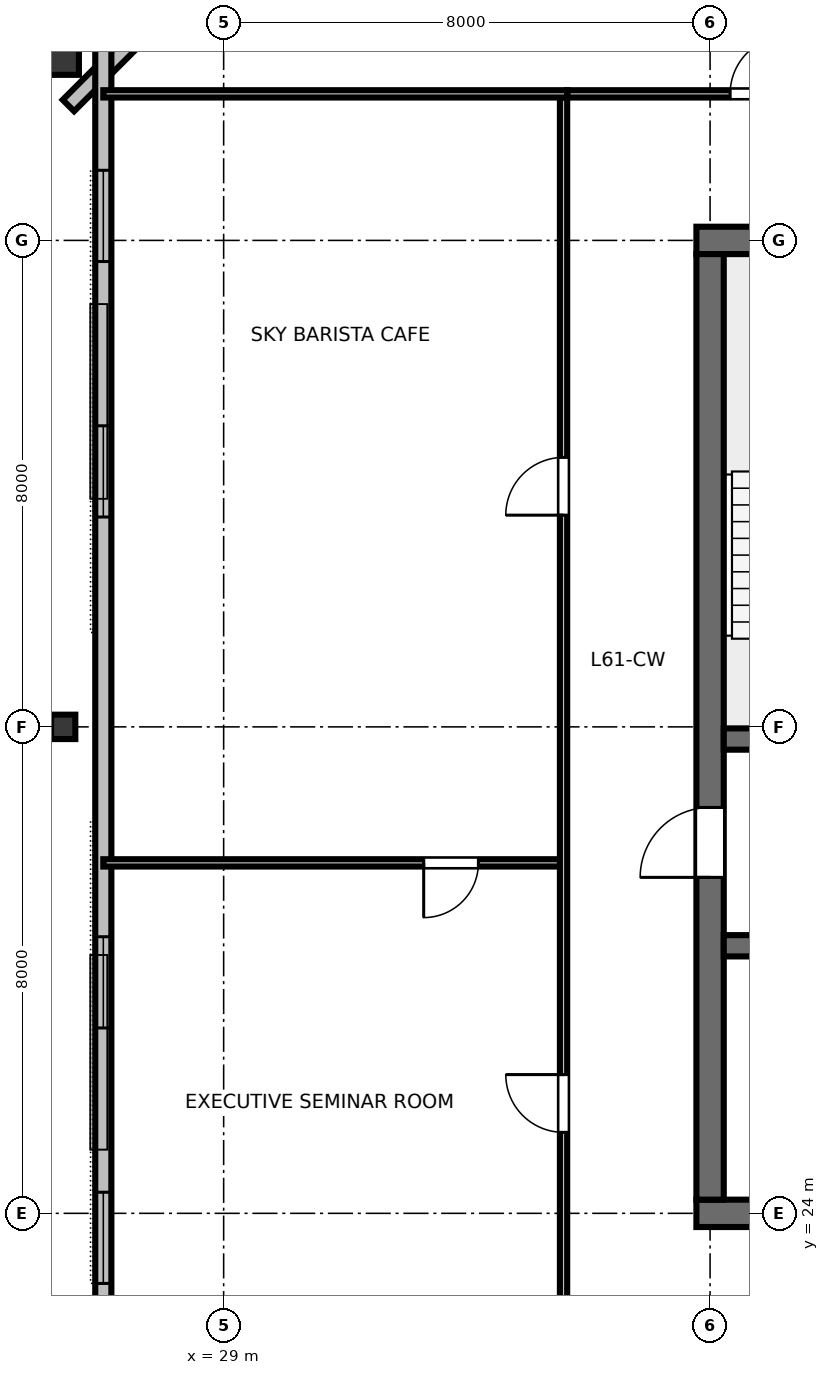
"""IFC4 building model, lengths in metres.
Left out: names, types, materials, properties, quantities, classifications, styles, units other than length and angle.
Written with IfcOpenShell. Run it as: python <this file> out.ifc"""

import sys

from ifc_helpers import new_model, si_unit, direction, frame, frame_2d, origin, origin_2d, place, context, subcontext, project, spatial, rectangle, hollow_rectangle, i_section, extrude, element, fill, save


model = new_model("IFC4")
c1 = context("Model", 3, precision=1e-05, world=origin(), true_north=direction((0.0, 1.0)))
c2 = subcontext(c1, "Body", "Model", "MODEL_VIEW")
j1 = project(units=[si_unit("LENGTHUNIT", "METRE"), si_unit("PLANEANGLEUNIT", "RADIAN")], contexts=[c1])
p1 = place(None, origin())
s1 = spatial("IfcSite", under=j1, at=p1, CompositionType="ELEMENT")
p2 = place(p1, origin())
s2 = spatial("IfcBuilding", under=s1, at=p2, CompositionType="ELEMENT")
p3 = place(p2, frame((0.0, 0.0, 231.0)))
s3 = spatial("IfcBuildingStorey", under=s2, at=p3, CompositionType="ELEMENT", Elevation=231.0)
p4 = place(p3, frame((36.775, 24.0, 0.0), z_axis=(0.0, 0.0, 1.0), x_axis=(1.0, 0.0, 0.0)))
e1 = element("IfcWall", 1, at=p4, inside=s3, PredefinedType="SHEAR", context=c2, shape_type="SweptSolid", body=[
    extrude(rectangle(XDim=18.45, YDim=0.45, at=frame_2d((9.225, 0.0))), origin(), (0.0, 0.0, 1.0), 3.28),
])
p5 = place(p4, frame((13.425, 0.0, 0.0)))
e2 = element("IfcOpeningElement", 2, at=p5, cuts=e1, PredefinedType="OPENING", context=c2, shape_type="SweptSolid", body=[
    extrude(rectangle(XDim=1.6, YDim=2.15, at=frame_2d((0.8, 1.075))), frame((0.0, 0.235, 0.0), z_axis=(0.0, -1.0, 0.0), x_axis=(1.0, 0.0, 0.0)), (0.0, 0.0, 1.0), 0.47),
])
p6 = place(p3, frame((36.775, 40.0, 0.0), z_axis=(0.0, 0.0, 1.0), x_axis=(1.0, 0.0, 0.0)))
e3 = element("IfcWall", 3, at=p6, inside=s3, PredefinedType="SHEAR", context=c2, shape_type="SweptSolid", body=[
    extrude(rectangle(XDim=18.45, YDim=0.45, at=frame_2d((9.225, 0.0))), origin(), (0.0, 0.0, 1.0), 3.28),
])
p7 = place(p6, frame((8.725, 0.0, 0.0)))
e4 = element("IfcOpeningElement", 4, at=p7, cuts=e3, PredefinedType="OPENING", context=c2, shape_type="SweptSolid", body=[
    extrude(rectangle(XDim=1.0, YDim=2.15, at=frame_2d((0.5, 1.075))), frame((0.0, 0.235, 0.0), z_axis=(0.0, -1.0, 0.0), x_axis=(1.0, 0.0, 0.0)), (0.0, 0.0, 1.0), 0.47),
])
p8 = place(p3, frame((37.0, 24.225, 0.0), z_axis=(0.0, 0.0, 1.0), x_axis=(0.0, 1.0, 0.0)))
e5 = element("IfcWall", 5, at=p8, inside=s3, PredefinedType="SHEAR", context=c2, shape_type="SweptSolid", body=[
    extrude(rectangle(XDim=15.55, YDim=0.45, at=frame_2d((7.775, 0.0))), origin(), (0.0, 0.0, 1.0), 3.28),
])
p9 = place(p8, frame((5.3, 0.0, 0.0)))
e6 = element("IfcOpeningElement", 6, at=p9, cuts=e5, PredefinedType="OPENING", context=c2, shape_type="SweptSolid", body=[
    extrude(rectangle(XDim=1.15, YDim=2.15, at=frame_2d((0.575, 1.075))), frame((0.0, 0.235, 0.0), z_axis=(0.0, -1.0, 0.0), x_axis=(1.0, 0.0, 0.0)), (0.0, 0.0, 1.0), 0.47),
])
p10 = place(p3, frame((37.225, 31.8, 0.0), z_axis=(0.0, 0.0, 1.0), x_axis=(1.0, 0.0, 0.0)))
e7 = element("IfcWall", 7, at=p10, inside=s3, PredefinedType="SHEAR", context=c2, shape_type="SweptSolid", body=[
    extrude(rectangle(XDim=17.55, YDim=0.35, at=frame_2d((8.775, 0.0))), origin(), (0.0, 0.0, 1.0), 3.28),
])
p11 = place(p10, frame((0.825, 0.0, 0.0)))
e8 = element("IfcOpeningElement", 8, at=p11, cuts=e7, PredefinedType="OPENING", context=c2, shape_type="SweptSolid", body=[
    extrude(rectangle(XDim=1.1, YDim=2.15, at=frame_2d((0.55, 1.075))), frame((0.0, 0.185, 0.0), z_axis=(0.0, -1.0, 0.0), x_axis=(1.0, 0.0, 0.0)), (0.0, 0.0, 1.0), 0.37),
])
p12 = place(p10, frame((14.725, 0.0, 0.0)))
e9 = element("IfcOpeningElement", 9, at=p12, cuts=e7, PredefinedType="OPENING", context=c2, shape_type="SweptSolid", body=[
    extrude(rectangle(XDim=1.1, YDim=2.15, at=frame_2d((0.55, 1.075))), frame((0.0, 0.185, 0.0), z_axis=(0.0, -1.0, 0.0), x_axis=(1.0, 0.0, 0.0)), (0.0, 0.0, 1.0), 0.37),
])
p13 = place(p3, frame((37.225, 28.4, 0.0), z_axis=(0.0, 0.0, 1.0), x_axis=(1.0, 0.0, 0.0)))
e10 = element("IfcWall", 10, at=p13, inside=s3, PredefinedType="SHEAR", context=c2, shape_type="SweptSolid", body=[
    extrude(rectangle(XDim=17.55, YDim=0.35, at=frame_2d((8.775, 0.0))), origin(), (0.0, 0.0, 1.0), 3.28),
])
p14 = place(p3, frame((26.27, 43.013, 0.0), z_axis=(0.062492571187, -0.054773773796, 0.996541274735), x_axis=(-0.749422115547, 0.656856913627, 0.083099264433)))
e11 = element("IfcColumn", 11, at=p14, inside=s3, PredefinedType="COLUMN", context=c2, shape_type="SweptSolid", body=[
    extrude(hollow_rectangle(XDim=0.58, YDim=0.7, WallThickness=0.032, at=origin_2d()), origin(), (0.0, 0.0, 1.0), 3.29),
])
p15 = place(p3, frame((26.361, 32.0, 0.0), z_axis=(0.06229035992, 0.0, 0.998058069984), x_axis=(-0.998058069984, 0.0, 0.06229035992)))
e12 = element("IfcColumn", 12, at=p15, inside=s3, PredefinedType="COLUMN", context=c2, shape_type="SweptSolid", body=[
    extrude(i_section(OverallWidth=0.401, OverallDepth=0.399, WebThickness=0.025, FlangeThickness=0.04, FilletRadius=0.025, at=origin_2d()), origin(), (0.0, 0.0, 1.0), 3.284),
])
p16 = place(p3, frame((33.914, 49.685, 0.0), z_axis=(0.0, 0.0, 1.0), x_axis=(-0.707106781187, -0.707106781187, 0.0)))
e13 = element("IfcWall", 13, at=p16, inside=s3, PredefinedType="STANDARD", context=c2, shape_type="SweptSolid", body=[
    extrude(rectangle(XDim=10.56, YDim=0.265, at=frame_2d((5.28, 0.0))), origin(), (0.0, 0.0, 1.0), 2.343),
])
p17 = place(p3, frame((27.021, 43.604, 0.0), z_axis=(0.0, 0.0, 1.0), x_axis=(0.0, -1.0, 0.0)))
e14 = element("IfcWall", 14, at=p17, inside=s3, PredefinedType="STANDARD", context=c2, shape_type="SweptSolid", body=[
    extrude(rectangle(XDim=23.207, YDim=0.265, at=frame_2d((11.604, 0.0))), origin(), (0.0, 0.0, 1.0), 3.28),
])
p18 = place(p17, frame((2.451, 0.0, 0.85)))
e15 = element("IfcOpeningElement", 15, at=p18, cuts=e14, PredefinedType="OPENING", context=c2, shape_type="SweptSolid", body=[
    extrude(rectangle(XDim=1.5, YDim=1.85, at=frame_2d((0.75, 0.925))), frame((0.0, 0.142, 0.0), z_axis=(0.0, -1.0, 0.0), x_axis=(1.0, 0.0, 0.0)), (0.0, 0.0, 1.0), 0.285),
])
p19 = place(p17, frame((6.652, 0.0, 0.85)))
e16 = element("IfcOpeningElement", 16, at=p19, cuts=e14, PredefinedType="OPENING", context=c2, shape_type="SweptSolid", body=[
    extrude(rectangle(XDim=1.5, YDim=1.85, at=frame_2d((0.75, 0.925))), frame((0.0, 0.142, 0.0), z_axis=(0.0, -1.0, 0.0), x_axis=(1.0, 0.0, 0.0)), (0.0, 0.0, 1.0), 0.285),
])
p20 = place(p17, frame((15.055, 0.0, 0.85)))
e17 = element("IfcOpeningElement", 17, at=p20, cuts=e14, PredefinedType="OPENING", context=c2, shape_type="SweptSolid", body=[
    extrude(rectangle(XDim=1.5, YDim=1.85, at=frame_2d((0.75, 0.925))), frame((0.0, 0.142, 0.0), z_axis=(0.0, -1.0, 0.0), x_axis=(1.0, 0.0, 0.0)), (0.0, 0.0, 1.0), 0.285),
])
p21 = place(p17, frame((19.257, 0.0, 0.85)))
e18 = element("IfcOpeningElement", 18, at=p21, cuts=e14, PredefinedType="OPENING", context=c2, shape_type="SweptSolid", body=[
    extrude(rectangle(XDim=1.5, YDim=1.85, at=frame_2d((0.75, 0.925))), frame((0.0, 0.142, 0.0), z_axis=(0.0, -1.0, 0.0), x_axis=(1.0, 0.0, 0.0)), (0.0, 0.0, 1.0), 0.285),
])
p22 = place(p3, frame((34.65, 42.41, 0.0), z_axis=(0.0, 0.0, 1.0), x_axis=(1.0, 0.0, 0.0)))
e19 = element("IfcWall", 19, at=p22, inside=s3, PredefinedType="PARTITIONING", context=c2, shape_type="SweptSolid", body=[
    extrude(rectangle(XDim=10.33, YDim=0.12, at=frame_2d((5.165, 0.0))), origin(), (0.0, 0.0, 1.0), 2.56),
])
p23 = place(p22, frame((2.679, 0.0, 0.0)))
e20 = element("IfcOpeningElement", 20, at=p23, cuts=e19, PredefinedType="OPENING", context=c2, shape_type="SweptSolid", body=[
    extrude(rectangle(XDim=0.95, YDim=2.15, at=frame_2d((0.475, 1.075))), frame((0.0, 0.07, 0.0), z_axis=(0.0, -1.0, 0.0), x_axis=(1.0, 0.0, 0.0)), (0.0, 0.0, 1.0), 0.14),
])
p24 = place(p22, frame((7.774, 0.0, 0.0)))
e21 = element("IfcOpeningElement", 21, at=p24, cuts=e19, PredefinedType="OPENING", context=c2, shape_type="SweptSolid", body=[
    extrude(rectangle(XDim=0.95, YDim=2.15, at=frame_2d((0.475, 1.075))), frame((0.0, 0.07, 0.0), z_axis=(0.0, -1.0, 0.0), x_axis=(1.0, 0.0, 0.0)), (0.0, 0.0, 1.0), 0.14),
])
p25 = place(p3, frame((34.59, 29.763, 0.0), z_axis=(0.0, 0.0, 1.0), x_axis=(-1.0, 0.0, 0.0)))
e22 = element("IfcWall", 22, at=p25, inside=s3, PredefinedType="PARTITIONING", context=c2, shape_type="SweptSolid", body=[
    extrude(rectangle(XDim=7.569, YDim=0.12, at=frame_2d((3.785, 0.0))), origin(), (0.0, 0.0, 1.0), 2.56),
])
p26 = place(p25, frame((1.4, 0.0, 0.0)))
e23 = element("IfcOpeningElement", 23, at=p26, cuts=e22, PredefinedType="OPENING", context=c2, shape_type="SweptSolid", body=[
    extrude(rectangle(XDim=0.9, YDim=2.15, at=frame_2d((0.45, 1.075))), frame((0.0, 0.07, 0.0), z_axis=(0.0, -1.0, 0.0), x_axis=(1.0, 0.0, 0.0)), (0.0, 0.0, 1.0), 0.14),
])
p27 = place(p3, frame((34.59, 21.65, 0.0), z_axis=(0.0, 0.0, 1.0), x_axis=(0.0, 1.0, 0.0)))
e24 = element("IfcWall", 24, at=p27, inside=s3, PredefinedType="PARTITIONING", context=c2, shape_type="SweptSolid", body=[
    extrude(rectangle(XDim=20.7, YDim=0.12, at=frame_2d((10.35, 0.0))), origin(), (0.0, 0.0, 1.0), 2.56),
])
p28 = place(p27, frame((3.682, 0.0, 0.0)))
e25 = element("IfcOpeningElement", 25, at=p28, cuts=e24, PredefinedType="OPENING", context=c2, shape_type="SweptSolid", body=[
    extrude(rectangle(XDim=0.95, YDim=2.15, at=frame_2d((0.475, 1.075))), frame((0.0, 0.07, 0.0), z_axis=(0.0, -1.0, 0.0), x_axis=(1.0, 0.0, 0.0)), (0.0, 0.0, 1.0), 0.14),
])
p29 = place(p27, frame((13.832, 0.0, 0.0)))
e26 = element("IfcOpeningElement", 26, at=p29, cuts=e24, PredefinedType="OPENING", context=c2, shape_type="SweptSolid", body=[
    extrude(rectangle(XDim=0.95, YDim=2.15, at=frame_2d((0.475, 1.075))), frame((0.0, 0.07, 0.0), z_axis=(0.0, -1.0, 0.0), x_axis=(1.0, 0.0, 0.0)), (0.0, 0.0, 1.0), 0.14),
])
p30 = place(p3, frame((34.65, 42.41, 0.0), z_axis=(0.0, 0.0, 1.0), x_axis=(-1.0, 0.0, 0.0)))
e27 = element("IfcWall", 27, at=p30, inside=s3, PredefinedType="PARTITIONING", context=c2, shape_type="SweptSolid", body=[
    extrude(rectangle(XDim=7.629, YDim=0.12, at=frame_2d((3.814, 0.0))), origin(), (0.0, 0.0, 1.0), 2.56),
])
p31 = place(p18, origin())
e28 = element("IfcWindow", 28, at=p31, inside=s3, PartitioningType="SINGLE_PANEL", PredefinedType="WINDOW", context=c2, shape_type="SweptSolid", body=[
    extrude(rectangle(XDim=1.5, YDim=1.85, at=frame_2d((0.75, 0.925))), frame((0.0, 0.03, 0.0), z_axis=(0.0, -1.0, 0.0), x_axis=(1.0, 0.0, 0.0)), (0.0, 0.0, 1.0), 0.06),
])
fill(e15, e28)
p32 = place(p19, origin())
e29 = element("IfcWindow", 29, at=p32, inside=s3, PartitioningType="SINGLE_PANEL", PredefinedType="WINDOW", context=c2, shape_type="SweptSolid", body=[
    extrude(rectangle(XDim=1.5, YDim=1.85, at=frame_2d((0.75, 0.925))), frame((0.0, 0.03, 0.0), z_axis=(0.0, -1.0, 0.0), x_axis=(1.0, 0.0, 0.0)), (0.0, 0.0, 1.0), 0.06),
])
fill(e16, e29)
p33 = place(p20, origin())
e30 = element("IfcWindow", 30, at=p33, inside=s3, PartitioningType="SINGLE_PANEL", PredefinedType="WINDOW", context=c2, shape_type="SweptSolid", body=[
    extrude(rectangle(XDim=1.5, YDim=1.85, at=frame_2d((0.75, 0.925))), frame((0.0, 0.03, 0.0), z_axis=(0.0, -1.0, 0.0), x_axis=(1.0, 0.0, 0.0)), (0.0, 0.0, 1.0), 0.06),
])
fill(e17, e30)
p34 = place(p21, origin())
e31 = element("IfcWindow", 31, at=p34, inside=s3, PartitioningType="SINGLE_PANEL", PredefinedType="WINDOW", context=c2, shape_type="SweptSolid", body=[
    extrude(rectangle(XDim=1.5, YDim=1.85, at=frame_2d((0.75, 0.925))), frame((0.0, 0.03, 0.0), z_axis=(0.0, -1.0, 0.0), x_axis=(1.0, 0.0, 0.0)), (0.0, 0.0, 1.0), 0.06),
])
fill(e18, e31)
p35 = place(p9, origin())
e32 = element("IfcDoor", 32, at=p35, inside=s3, OperationType="SINGLE_SWING_LEFT", PredefinedType="DOOR", context=c2, shape_type="SweptSolid", body=[
    extrude(rectangle(XDim=1.15, YDim=2.15, at=frame_2d((0.575, 1.075))), frame((0.0, 0.025, 0.0), z_axis=(0.0, -1.0, 0.0), x_axis=(1.0, 0.0, 0.0)), (0.0, 0.0, 1.0), 0.05),
])
fill(e6, e32)
p36 = place(p23, origin())
e33 = element("IfcDoor", 33, at=p36, inside=s3, OperationType="SINGLE_SWING_RIGHT", PredefinedType="DOOR", context=c2, shape_type="SweptSolid", body=[
    extrude(rectangle(XDim=0.95, YDim=2.15, at=frame_2d((0.475, 1.075))), frame((0.0, 0.025, 0.0), z_axis=(0.0, -1.0, 0.0), x_axis=(1.0, 0.0, 0.0)), (0.0, 0.0, 1.0), 0.05),
])
fill(e20, e33)
p37 = place(p26, origin())
e34 = element("IfcDoor", 34, at=p37, inside=s3, OperationType="SINGLE_SWING_RIGHT", PredefinedType="DOOR", context=c2, shape_type="SweptSolid", body=[
    extrude(rectangle(XDim=0.9, YDim=2.15, at=frame_2d((0.45, 1.075))), frame((0.0, 0.025, 0.0), z_axis=(0.0, -1.0, 0.0), x_axis=(1.0, 0.0, 0.0)), (0.0, 0.0, 1.0), 0.05),
])
fill(e23, e34)
p38 = place(p28, origin())
e35 = element("IfcDoor", 35, at=p38, inside=s3, OperationType="SINGLE_SWING_RIGHT", PredefinedType="DOOR", context=c2, shape_type="SweptSolid", body=[
    extrude(rectangle(XDim=0.95, YDim=2.15, at=frame_2d((0.475, 1.075))), frame((0.0, 0.025, 0.0), z_axis=(0.0, -1.0, 0.0), x_axis=(1.0, 0.0, 0.0)), (0.0, 0.0, 1.0), 0.05),
])
fill(e25, e35)
p39 = place(p29, origin())
e36 = element("IfcDoor", 36, at=p39, inside=s3, OperationType="SINGLE_SWING_LEFT", PredefinedType="DOOR", context=c2, shape_type="SweptSolid", body=[
    extrude(rectangle(XDim=0.95, YDim=2.15, at=frame_2d((0.475, 1.075))), frame((0.0, 0.025, 0.0), z_axis=(0.0, -1.0, 0.0), x_axis=(1.0, 0.0, 0.0)), (0.0, 0.0, 1.0), 0.05),
])
fill(e26, e36)
save(model, sys.argv[1])
